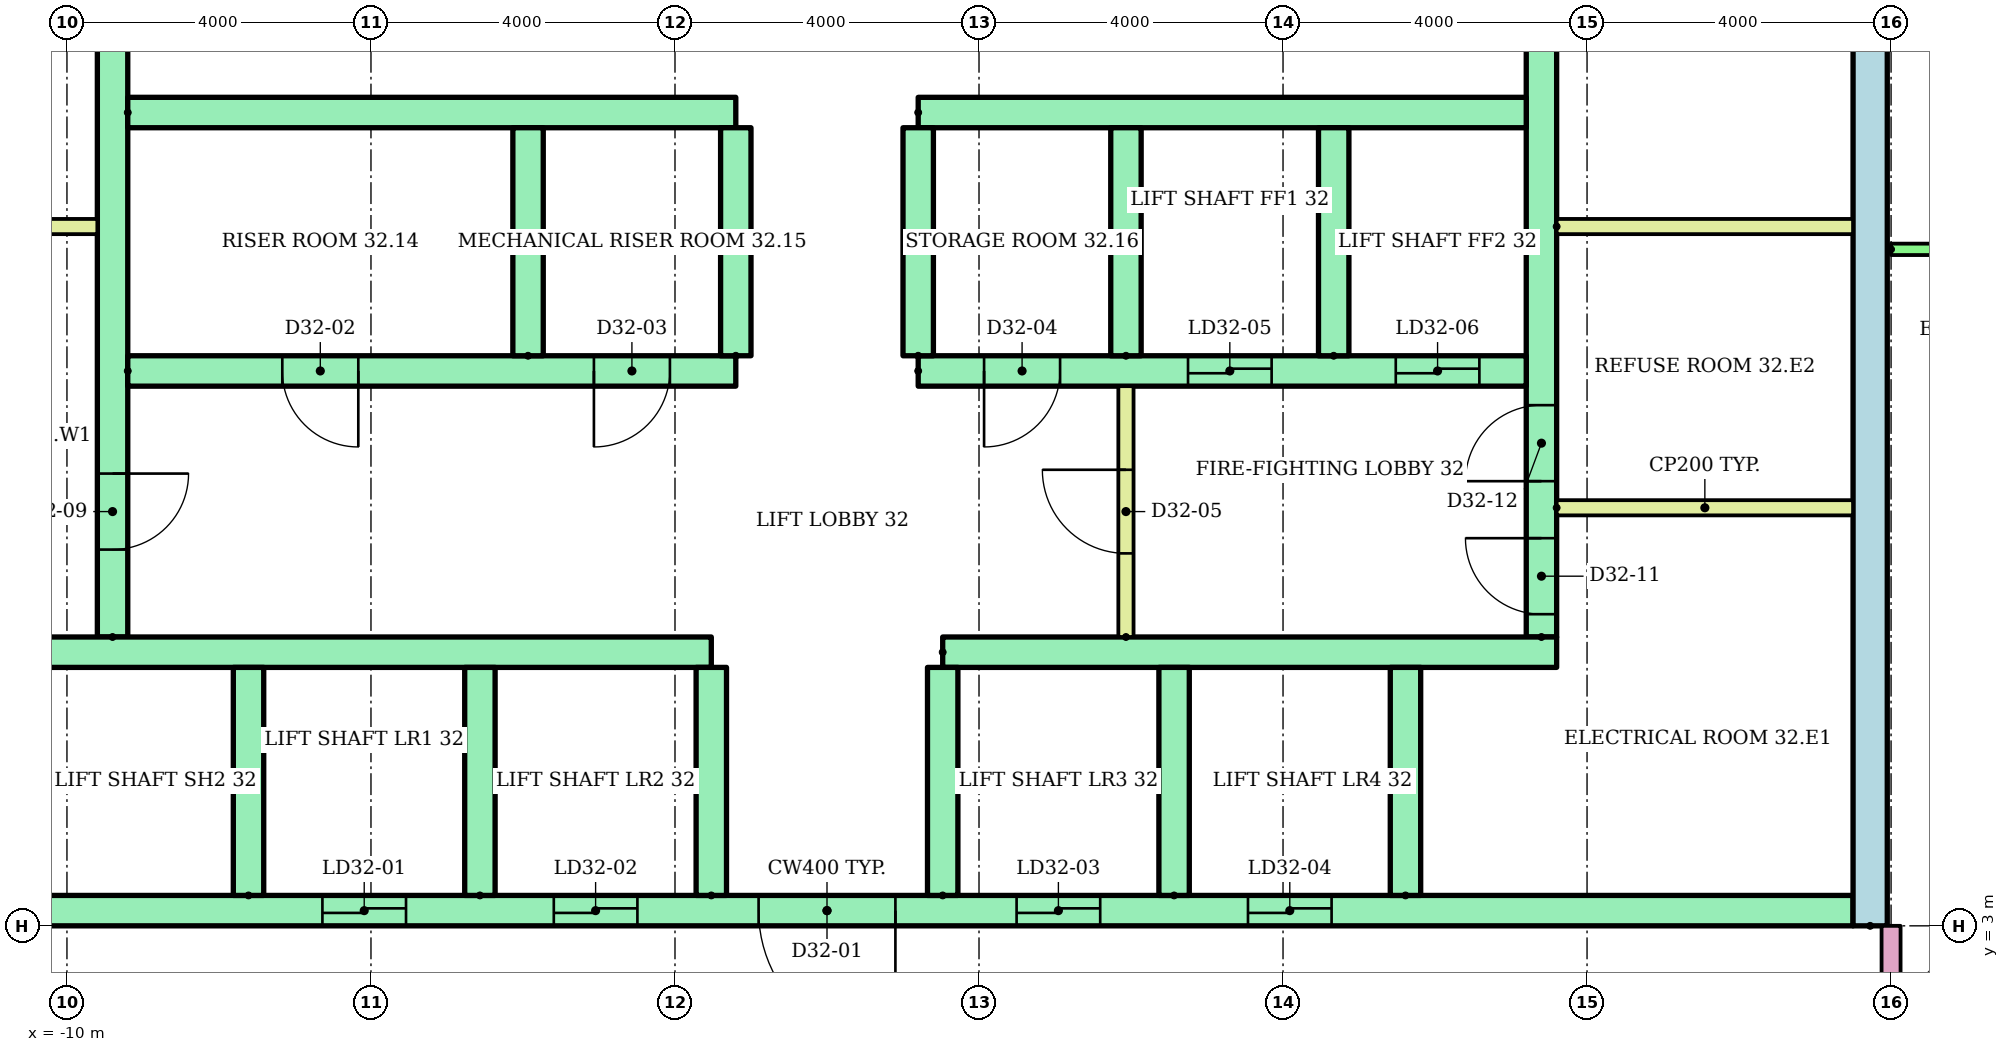
"""IFC4 building model, lengths in metres.
Left out: names, types, materials, properties, quantities, classifications, styles, units other than length and angle.
Written with IfcOpenShell. Run it as: python <this file> out.ifc"""

import sys

from ifc_helpers import new_model, si_unit, direction, frame, frame_2d, origin, place, context, subcontext, project, spatial, rectangle, extrude, element, fill, save


model = new_model("IFC4")
c1 = context("Model", 3, precision=1e-05, world=origin(), true_north=direction((0.0, 1.0)))
c2 = subcontext(c1, "Body", "Model", "MODEL_VIEW")
j1 = project(units=[si_unit("LENGTHUNIT", "METRE"), si_unit("PLANEANGLEUNIT", "RADIAN")], contexts=[c1])
p1 = place(None, origin())
s1 = spatial("IfcSite", under=j1, at=p1, CompositionType="ELEMENT")
p2 = place(p1, origin())
s2 = spatial("IfcBuilding", under=s1, at=p2, CompositionType="ELEMENT")
p3 = place(p2, frame((0.0, 0.0, 126.2)))
s3 = spatial("IfcBuildingStorey", under=s2, at=p3, CompositionType="ELEMENT", Elevation=126.2)
p4 = place(p3, frame((13.725, 3.0, 0.0), z_axis=(0.0, 0.0, 1.0), x_axis=(0.0, 1.0, 0.0)))
e1 = element("IfcWall", 1, at=p4, inside=s3, PredefinedType="SHEAR", context=c2, shape_type="SweptSolid", body=[
    extrude(rectangle(XDim=17.0, YDim=0.45, at=frame_2d((8.5, 0.0))), origin(), (0.0, 0.0, 1.0), 2.92),
])
p5 = place(p3, frame((-9.4, 6.8, 0.0), z_axis=(0.0, 0.0, 1.0), x_axis=(0.0, 1.0, 0.0)))
e2 = element("IfcWall", 2, at=p5, inside=s3, PredefinedType="SHEAR", context=c2, shape_type="SweptSolid", body=[
    extrude(rectangle(XDim=12.7, YDim=0.4, at=frame_2d((6.35, 0.0))), origin(), (0.0, 0.0, 1.0), 2.92),
])
p6 = place(p5, frame((1.15, 0.0, 0.0)))
e3 = element("IfcOpeningElement", 3, at=p6, cuts=e2, PredefinedType="OPENING", context=c2, shape_type="SweptSolid", body=[
    extrude(rectangle(XDim=1.0, YDim=2.1, at=frame_2d((0.5, 1.05))), frame((0.0, 0.21, 0.0), z_axis=(0.0, -1.0, 0.0), x_axis=(1.0, 0.0, 0.0)), (0.0, 0.0, 1.0), 0.42),
])
p7 = place(p5, frame((7.925, 0.0, 0.0)))
e4 = element("IfcOpeningElement", 4, at=p7, cuts=e2, PredefinedType="OPENING", context=c2, shape_type="SweptSolid", body=[
    extrude(rectangle(XDim=1.0, YDim=2.1, at=frame_2d((0.5, 1.05))), frame((0.0, 0.21, 0.0), z_axis=(0.0, -1.0, 0.0), x_axis=(1.0, 0.0, 0.0)), (0.0, 0.0, 1.0), 0.42),
])
p8 = place(p3, frame((9.4, 6.8, 0.0), z_axis=(0.0, 0.0, 1.0), x_axis=(0.0, 1.0, 0.0)))
e5 = element("IfcWall", 5, at=p8, inside=s3, PredefinedType="SHEAR", context=c2, shape_type="SweptSolid", body=[
    extrude(rectangle(XDim=12.7, YDim=0.4, at=frame_2d((6.35, 0.0))), origin(), (0.0, 0.0, 1.0), 2.92),
])
p9 = place(p8, frame((0.3, 0.0, 0.0)))
e6 = element("IfcOpeningElement", 6, at=p9, cuts=e5, PredefinedType="OPENING", context=c2, shape_type="SweptSolid", body=[
    extrude(rectangle(XDim=1.0, YDim=2.1, at=frame_2d((0.5, 1.05))), frame((0.0, 0.21, 0.0), z_axis=(0.0, -1.0, 0.0), x_axis=(1.0, 0.0, 0.0)), (0.0, 0.0, 1.0), 0.42),
])
p10 = place(p8, frame((2.05, 0.0, 0.0)))
e7 = element("IfcOpeningElement", 7, at=p10, cuts=e5, PredefinedType="OPENING", context=c2, shape_type="SweptSolid", body=[
    extrude(rectangle(XDim=1.0, YDim=2.1, at=frame_2d((0.5, 1.05))), frame((0.0, 0.21, 0.0), z_axis=(0.0, -1.0, 0.0), x_axis=(1.0, 0.0, 0.0)), (0.0, 0.0, 1.0), 0.42),
])
p11 = place(p8, frame((7.925, 0.0, 0.0)))
e8 = element("IfcOpeningElement", 8, at=p11, cuts=e5, PredefinedType="OPENING", context=c2, shape_type="SweptSolid", body=[
    extrude(rectangle(XDim=1.0, YDim=2.1, at=frame_2d((0.5, 1.05))), frame((0.0, 0.21, 0.0), z_axis=(0.0, -1.0, 0.0), x_axis=(1.0, 0.0, 0.0)), (0.0, 0.0, 1.0), 0.42),
])
p12 = place(p3, frame((-13.5, 3.2, 0.0)))
e9 = element("IfcWall", 9, at=p12, inside=s3, PredefinedType="SHEAR", context=c2, shape_type="SweptSolid", body=[
    extrude(rectangle(XDim=27.0, YDim=0.4, at=frame_2d((13.5, 0.0))), origin(), (0.0, 0.0, 1.0), 2.92),
])
p13 = place(p12, frame((6.861, 0.0, 0.0)))
e10 = element("IfcOpeningElement", 10, at=p13, cuts=e9, PredefinedType="OPENING", context=c2, shape_type="SweptSolid", body=[
    extrude(rectangle(XDim=1.1, YDim=2.1, at=frame_2d((0.55, 1.05))), frame((0.0, 0.21, 0.0), z_axis=(0.0, -1.0, 0.0), x_axis=(1.0, 0.0, 0.0)), (0.0, 0.0, 1.0), 0.42),
])
p14 = place(p12, frame((9.906, 0.0, 0.0)))
e11 = element("IfcOpeningElement", 11, at=p14, cuts=e9, PredefinedType="OPENING", context=c2, shape_type="SweptSolid", body=[
    extrude(rectangle(XDim=1.1, YDim=2.1, at=frame_2d((0.55, 1.05))), frame((0.0, 0.21, 0.0), z_axis=(0.0, -1.0, 0.0), x_axis=(1.0, 0.0, 0.0)), (0.0, 0.0, 1.0), 0.42),
])
p15 = place(p12, frame((15.994, 0.0, 0.0)))
e12 = element("IfcOpeningElement", 12, at=p15, cuts=e9, PredefinedType="OPENING", context=c2, shape_type="SweptSolid", body=[
    extrude(rectangle(XDim=1.1, YDim=2.1, at=frame_2d((0.55, 1.05))), frame((0.0, 0.21, 0.0), z_axis=(0.0, -1.0, 0.0), x_axis=(1.0, 0.0, 0.0)), (0.0, 0.0, 1.0), 0.42),
])
p16 = place(p12, frame((19.039, 0.0, 0.0)))
e13 = element("IfcOpeningElement", 13, at=p16, cuts=e9, PredefinedType="OPENING", context=c2, shape_type="SweptSolid", body=[
    extrude(rectangle(XDim=1.1, YDim=2.1, at=frame_2d((0.55, 1.05))), frame((0.0, 0.21, 0.0), z_axis=(0.0, -1.0, 0.0), x_axis=(1.0, 0.0, 0.0)), (0.0, 0.0, 1.0), 0.42),
])
p17 = place(p12, frame((12.6, 0.0, 0.0)))
e14 = element("IfcOpeningElement", 14, at=p17, cuts=e9, PredefinedType="OPENING", context=c2, shape_type="SweptSolid", body=[
    extrude(rectangle(XDim=1.8, YDim=2.1, at=frame_2d((0.9, 1.05))), frame((0.0, 0.21, 0.0), z_axis=(0.0, -1.0, 0.0), x_axis=(1.0, 0.0, 0.0)), (0.0, 0.0, 1.0), 0.42),
])
p18 = place(p3, frame((-13.5, 6.6, 0.0)))
e15 = element("IfcWall", 15, at=p18, inside=s3, PredefinedType="SHEAR", context=c2, shape_type="SweptSolid", body=[
    extrude(rectangle(XDim=11.978, YDim=0.4, at=frame_2d((5.989, 0.0))), origin(), (0.0, 0.0, 1.0), 2.92),
])
p19 = place(p3, frame((1.522, 6.6, 0.0)))
e16 = element("IfcWall", 16, at=p19, inside=s3, PredefinedType="SHEAR", context=c2, shape_type="SweptSolid", body=[
    extrude(rectangle(XDim=8.078, YDim=0.4, at=frame_2d((4.039, 0.0))), origin(), (0.0, 0.0, 1.0), 2.92),
])
for number, where, z_axis, x_axis in (
    (17, (-7.611, 3.4, 0.0), (0.0, 0.0, 1.0), (0.0, 1.0, 0.0)),
    (18, (-4.567, 3.4, 0.0), (0.0, 0.0, 1.0), (0.0, 1.0, 0.0)),
    (19, (-1.522, 3.4, 0.0), (0.0, 0.0, 1.0), (0.0, 1.0, 0.0)),
    (20, (1.522, 3.4, 0.0), (0.0, 0.0, 1.0), (0.0, 1.0, 0.0)),
    (21, (4.567, 3.4, 0.0), (0.0, 0.0, 1.0), (0.0, 1.0, 0.0)),
    (22, (7.611, 3.4, 0.0), (0.0, 0.0, 1.0), (0.0, 1.0, 0.0)),
):
    element("IfcWall", number, at=place(p3, frame(where, z_axis=z_axis, x_axis=x_axis)), inside=s3, PredefinedType="SHEAR", context=c2, shape_type="SweptSolid", body=[
        extrude(rectangle(XDim=3.0, YDim=0.4, at=frame_2d((1.5, 0.0))), origin(), (0.0, 0.0, 1.0), 2.92),
    ])
p20 = place(p3, frame((-9.2, 10.3, 0.0)))
e23 = element("IfcWall", 23, at=p20, inside=s3, PredefinedType="SHEAR", context=c2, shape_type="SweptSolid", body=[
    extrude(rectangle(XDim=8.0, YDim=0.4, at=frame_2d((4.0, 0.0))), origin(), (0.0, 0.0, 1.0), 2.92),
])
p21 = place(p20, frame((2.033, 0.0, 0.0)))
e24 = element("IfcOpeningElement", 24, at=p21, cuts=e23, PredefinedType="OPENING", context=c2, shape_type="SweptSolid", body=[
    extrude(rectangle(XDim=1.0, YDim=2.1, at=frame_2d((0.5, 1.05))), frame((0.0, 0.21, 0.0), z_axis=(0.0, -1.0, 0.0), x_axis=(1.0, 0.0, 0.0)), (0.0, 0.0, 1.0), 0.42),
])
p22 = place(p20, frame((6.133, 0.0, 0.0)))
e25 = element("IfcOpeningElement", 25, at=p22, cuts=e23, PredefinedType="OPENING", context=c2, shape_type="SweptSolid", body=[
    extrude(rectangle(XDim=1.0, YDim=2.1, at=frame_2d((0.5, 1.05))), frame((0.0, 0.21, 0.0), z_axis=(0.0, -1.0, 0.0), x_axis=(1.0, 0.0, 0.0)), (0.0, 0.0, 1.0), 0.42),
])
p23 = place(p3, frame((-9.2, 13.7, 0.0)))
e26 = element("IfcWall", 26, at=p23, inside=s3, PredefinedType="SHEAR", context=c2, shape_type="SweptSolid", body=[
    extrude(rectangle(XDim=8.0, YDim=0.4, at=frame_2d((4.0, 0.0))), origin(), (0.0, 0.0, 1.0), 2.92),
])
p24 = place(p3, frame((1.2, 10.3, 0.0)))
e27 = element("IfcWall", 27, at=p24, inside=s3, PredefinedType="SHEAR", context=c2, shape_type="SweptSolid", body=[
    extrude(rectangle(XDim=8.0, YDim=0.4, at=frame_2d((4.0, 0.0))), origin(), (0.0, 0.0, 1.0), 2.92),
])
p25 = place(p24, frame((3.55, 0.0, 0.0)))
e28 = element("IfcOpeningElement", 28, at=p25, cuts=e27, PredefinedType="OPENING", context=c2, shape_type="SweptSolid", body=[
    extrude(rectangle(XDim=1.1, YDim=2.1, at=frame_2d((0.55, 1.05))), frame((0.0, 0.21, 0.0), z_axis=(0.0, -1.0, 0.0), x_axis=(1.0, 0.0, 0.0)), (0.0, 0.0, 1.0), 0.42),
])
p26 = place(p24, frame((6.283, 0.0, 0.0)))
e29 = element("IfcOpeningElement", 29, at=p26, cuts=e27, PredefinedType="OPENING", context=c2, shape_type="SweptSolid", body=[
    extrude(rectangle(XDim=1.1, YDim=2.1, at=frame_2d((0.55, 1.05))), frame((0.0, 0.21, 0.0), z_axis=(0.0, -1.0, 0.0), x_axis=(1.0, 0.0, 0.0)), (0.0, 0.0, 1.0), 0.42),
])
p27 = place(p24, frame((0.867, 0.0, 0.0)))
e30 = element("IfcOpeningElement", 30, at=p27, cuts=e27, PredefinedType="OPENING", context=c2, shape_type="SweptSolid", body=[
    extrude(rectangle(XDim=1.0, YDim=2.1, at=frame_2d((0.5, 1.05))), frame((0.0, 0.21, 0.0), z_axis=(0.0, -1.0, 0.0), x_axis=(1.0, 0.0, 0.0)), (0.0, 0.0, 1.0), 0.42),
])
p28 = place(p3, frame((1.2, 13.7, 0.0)))
e31 = element("IfcWall", 31, at=p28, inside=s3, PredefinedType="SHEAR", context=c2, shape_type="SweptSolid", body=[
    extrude(rectangle(XDim=8.0, YDim=0.4, at=frame_2d((4.0, 0.0))), origin(), (0.0, 0.0, 1.0), 2.92),
])
for number, where, z_axis, x_axis in (
    (32, (-3.933, 10.5, 0.0), (0.0, 0.0, 1.0), (0.0, 1.0, 0.0)),
    (33, (-1.2, 10.5, 0.0), (0.0, 0.0, 1.0), (0.0, 1.0, 0.0)),
    (34, (1.2, 10.5, 0.0), (0.0, 0.0, 1.0), (0.0, 1.0, 0.0)),
    (35, (3.933, 10.5, 0.0), (0.0, 0.0, 1.0), (0.0, 1.0, 0.0)),
    (36, (6.667, 10.5, 0.0), (0.0, 0.0, 1.0), (0.0, 1.0, 0.0)),
):
    element("IfcWall", number, at=place(p3, frame(where, z_axis=z_axis, x_axis=x_axis)), inside=s3, PredefinedType="SHEAR", context=c2, shape_type="SweptSolid", body=[
        extrude(rectangle(XDim=3.0, YDim=0.4, at=frame_2d((1.5, 0.0))), origin(), (0.0, 0.0, 1.0), 2.92),
    ])
p29 = place(p3, frame((3.933, 6.8, 0.0), z_axis=(0.0, 0.0, 1.0), x_axis=(0.0, 1.0, 0.0)))
e37 = element("IfcWall", 37, at=p29, inside=s3, PredefinedType="PARTITIONING", context=c2, shape_type="SweptSolid", body=[
    extrude(rectangle(XDim=3.3, YDim=0.2, at=frame_2d((1.65, 0.0))), origin(), (0.0, 0.0, 1.0), 2.92),
])
p30 = place(p29, frame((1.1, 0.0, 0.0)))
e38 = element("IfcOpeningElement", 38, at=p30, cuts=e37, PredefinedType="OPENING", context=c2, shape_type="SweptSolid", body=[
    extrude(rectangle(XDim=1.1, YDim=2.1, at=frame_2d((0.55, 1.05))), frame((0.0, 0.11, 0.0), z_axis=(0.0, -1.0, 0.0), x_axis=(1.0, 0.0, 0.0)), (0.0, 0.0, 1.0), 0.22),
])
for number, where in (
    (39, (-13.5, 12.2, 0.0)),
    (40, (9.6, 8.5, 0.0)),
    (41, (9.6, 12.2, 0.0)),
):
    element("IfcWall", number, at=place(p3, frame(where)), inside=s3, PredefinedType="PARTITIONING", context=c2, shape_type="SweptSolid", body=[
        extrude(rectangle(XDim=3.9, YDim=0.2, at=frame_2d((1.95, 0.0))), origin(), (0.0, 0.0, 1.0), 2.92),
    ])
p31 = place(p3, frame((14.0, 11.9, 0.0)))
e42 = element("IfcWall", 42, at=p31, inside=s3, PredefinedType="PARTITIONING", context=c2, shape_type="SweptSolid", body=[
    extrude(rectangle(XDim=18.72, YDim=0.15, at=frame_2d((9.36, 0.0))), origin(), (0.0, 0.0, 1.0), 2.4),
])
p32 = place(p31, frame((1.5, 0.0, 0.0)))
e43 = element("IfcOpeningElement", 43, at=p32, cuts=e42, PredefinedType="OPENING", context=c2, shape_type="SweptSolid", body=[
    extrude(rectangle(XDim=1.0, YDim=2.1, at=frame_2d((0.5, 1.05))), frame((0.0, 0.085, 0.0), z_axis=(0.0, -1.0, 0.0), x_axis=(1.0, 0.0, 0.0)), (0.0, 0.0, 1.0), 0.17),
])
p33 = place(p31, frame((7.55, 0.0, 0.0)))
e44 = element("IfcOpeningElement", 44, at=p33, cuts=e42, PredefinedType="OPENING", context=c2, shape_type="SweptSolid", body=[
    extrude(rectangle(XDim=0.9, YDim=2.1, at=frame_2d((0.45, 1.05))), frame((0.0, 0.085, 0.0), z_axis=(0.0, -1.0, 0.0), x_axis=(1.0, 0.0, 0.0)), (0.0, 0.0, 1.0), 0.17),
])
p34 = place(p31, frame((14.8, 0.0, 0.0)))
e45 = element("IfcOpeningElement", 45, at=p34, cuts=e42, PredefinedType="OPENING", context=c2, shape_type="SweptSolid", body=[
    extrude(rectangle(XDim=0.9, YDim=2.1, at=frame_2d((0.45, 1.05))), frame((0.0, 0.085, 0.0), z_axis=(0.0, -1.0, 0.0), x_axis=(1.0, 0.0, 0.0)), (0.0, 0.0, 1.0), 0.17),
])
p35 = place(p3, frame((14.0, 1.4, 0.0), z_axis=(0.0, 0.0, 1.0), x_axis=(0.0, 1.0, 0.0)))
e46 = element("IfcWall", 46, at=p35, inside=s3, PredefinedType="PARTITIONING", context=c2, shape_type="SweptSolid", body=[
    extrude(rectangle(XDim=1.6, YDim=0.25, at=frame_2d((0.8, 0.0))), origin(), (0.0, 0.0, 1.0), 2.4),
])
p36 = place(p13, origin())
e47 = element("IfcDoor", 47, at=p36, inside=s3, OperationType="SLIDING_TO_LEFT", PredefinedType="DOOR", context=c2, shape_type="SweptSolid", body=[
    extrude(rectangle(XDim=1.1, YDim=2.1, at=frame_2d((0.55, 1.05))), frame((0.0, 0.025, 0.0), z_axis=(0.0, -1.0, 0.0), x_axis=(1.0, 0.0, 0.0)), (0.0, 0.0, 1.0), 0.05),
])
fill(e10, e47)
p37 = place(p14, origin())
e48 = element("IfcDoor", 48, at=p37, inside=s3, OperationType="SLIDING_TO_LEFT", PredefinedType="DOOR", context=c2, shape_type="SweptSolid", body=[
    extrude(rectangle(XDim=1.1, YDim=2.1, at=frame_2d((0.55, 1.05))), frame((0.0, 0.025, 0.0), z_axis=(0.0, -1.0, 0.0), x_axis=(1.0, 0.0, 0.0)), (0.0, 0.0, 1.0), 0.05),
])
fill(e11, e48)
p38 = place(p15, origin())
e49 = element("IfcDoor", 49, at=p38, inside=s3, OperationType="SLIDING_TO_LEFT", PredefinedType="DOOR", context=c2, shape_type="SweptSolid", body=[
    extrude(rectangle(XDim=1.1, YDim=2.1, at=frame_2d((0.55, 1.05))), frame((0.0, 0.025, 0.0), z_axis=(0.0, -1.0, 0.0), x_axis=(1.0, 0.0, 0.0)), (0.0, 0.0, 1.0), 0.05),
])
fill(e12, e49)
p39 = place(p16, origin())
e50 = element("IfcDoor", 50, at=p39, inside=s3, OperationType="SLIDING_TO_LEFT", PredefinedType="DOOR", context=c2, shape_type="SweptSolid", body=[
    extrude(rectangle(XDim=1.1, YDim=2.1, at=frame_2d((0.55, 1.05))), frame((0.0, 0.025, 0.0), z_axis=(0.0, -1.0, 0.0), x_axis=(1.0, 0.0, 0.0)), (0.0, 0.0, 1.0), 0.05),
])
fill(e13, e50)
p40 = place(p17, frame((1.8, 0.0, 0.0), z_axis=(0.0, 0.0, 1.0), x_axis=(-1.0, 0.0, 0.0)))
e51 = element("IfcDoor", 51, at=p40, inside=s3, OperationType="DOUBLE_DOOR_SINGLE_SWING", PredefinedType="DOOR", context=c2, shape_type="SweptSolid", body=[
    extrude(rectangle(XDim=1.8, YDim=2.1, at=frame_2d((0.9, 1.05))), frame((0.0, 0.025, 0.0), z_axis=(0.0, -1.0, 0.0), x_axis=(1.0, 0.0, 0.0)), (0.0, 0.0, 1.0), 0.05),
])
fill(e14, e51)
p41 = place(p25, origin())
e52 = element("IfcDoor", 52, at=p41, inside=s3, OperationType="SLIDING_TO_LEFT", PredefinedType="DOOR", context=c2, shape_type="SweptSolid", body=[
    extrude(rectangle(XDim=1.1, YDim=2.1, at=frame_2d((0.55, 1.05))), frame((0.0, 0.025, 0.0), z_axis=(0.0, -1.0, 0.0), x_axis=(1.0, 0.0, 0.0)), (0.0, 0.0, 1.0), 0.05),
])
fill(e28, e52)
p42 = place(p26, origin())
e53 = element("IfcDoor", 53, at=p42, inside=s3, OperationType="SLIDING_TO_LEFT", PredefinedType="DOOR", context=c2, shape_type="SweptSolid", body=[
    extrude(rectangle(XDim=1.1, YDim=2.1, at=frame_2d((0.55, 1.05))), frame((0.0, 0.025, 0.0), z_axis=(0.0, -1.0, 0.0), x_axis=(1.0, 0.0, 0.0)), (0.0, 0.0, 1.0), 0.05),
])
fill(e29, e53)
p43 = place(p21, frame((1.0, 0.0, 0.0), z_axis=(0.0, 0.0, 1.0), x_axis=(-1.0, 0.0, 0.0)))
e54 = element("IfcDoor", 54, at=p43, inside=s3, OperationType="SINGLE_SWING_RIGHT", PredefinedType="DOOR", context=c2, shape_type="SweptSolid", body=[
    extrude(rectangle(XDim=1.0, YDim=2.1, at=frame_2d((0.5, 1.05))), frame((0.0, 0.025, 0.0), z_axis=(0.0, -1.0, 0.0), x_axis=(1.0, 0.0, 0.0)), (0.0, 0.0, 1.0), 0.05),
])
fill(e24, e54)
p44 = place(p22, frame((1.0, 0.0, 0.0), z_axis=(0.0, 0.0, 1.0), x_axis=(-1.0, 0.0, 0.0)))
e55 = element("IfcDoor", 55, at=p44, inside=s3, OperationType="SINGLE_SWING_LEFT", PredefinedType="DOOR", context=c2, shape_type="SweptSolid", body=[
    extrude(rectangle(XDim=1.0, YDim=2.1, at=frame_2d((0.5, 1.05))), frame((0.0, 0.025, 0.0), z_axis=(0.0, -1.0, 0.0), x_axis=(1.0, 0.0, 0.0)), (0.0, 0.0, 1.0), 0.05),
])
fill(e25, e55)
p45 = place(p27, frame((1.0, 0.0, 0.0), z_axis=(0.0, 0.0, 1.0), x_axis=(-1.0, 0.0, 0.0)))
e56 = element("IfcDoor", 56, at=p45, inside=s3, OperationType="SINGLE_SWING_LEFT", PredefinedType="DOOR", context=c2, shape_type="SweptSolid", body=[
    extrude(rectangle(XDim=1.0, YDim=2.1, at=frame_2d((0.5, 1.05))), frame((0.0, 0.025, 0.0), z_axis=(0.0, -1.0, 0.0), x_axis=(1.0, 0.0, 0.0)), (0.0, 0.0, 1.0), 0.05),
])
fill(e30, e56)
p46 = place(p30, origin())
e57 = element("IfcDoor", 57, at=p46, inside=s3, OperationType="SINGLE_SWING_RIGHT", PredefinedType="DOOR", context=c2, shape_type="SweptSolid", body=[
    extrude(rectangle(XDim=1.1, YDim=2.1, at=frame_2d((0.55, 1.05))), frame((0.0, 0.025, 0.0), z_axis=(0.0, -1.0, 0.0), x_axis=(1.0, 0.0, 0.0)), (0.0, 0.0, 1.0), 0.05),
])
fill(e38, e57)
p47 = place(p6, frame((1.0, 0.0, 0.0), z_axis=(0.0, 0.0, 1.0), x_axis=(-1.0, 0.0, 0.0)))
e58 = element("IfcDoor", 58, at=p47, inside=s3, OperationType="SINGLE_SWING_RIGHT", PredefinedType="DOOR", context=c2, shape_type="SweptSolid", body=[
    extrude(rectangle(XDim=1.0, YDim=2.1, at=frame_2d((0.5, 1.05))), frame((0.0, 0.025, 0.0), z_axis=(0.0, -1.0, 0.0), x_axis=(1.0, 0.0, 0.0)), (0.0, 0.0, 1.0), 0.05),
])
fill(e3, e58)
p48 = place(p9, origin())
e59 = element("IfcDoor", 59, at=p48, inside=s3, OperationType="SINGLE_SWING_RIGHT", PredefinedType="DOOR", context=c2, shape_type="SweptSolid", body=[
    extrude(rectangle(XDim=1.0, YDim=2.1, at=frame_2d((0.5, 1.05))), frame((0.0, 0.025, 0.0), z_axis=(0.0, -1.0, 0.0), x_axis=(1.0, 0.0, 0.0)), (0.0, 0.0, 1.0), 0.05),
])
fill(e6, e59)
p49 = place(p10, origin())
e60 = element("IfcDoor", 60, at=p49, inside=s3, OperationType="SINGLE_SWING_LEFT", PredefinedType="DOOR", context=c2, shape_type="SweptSolid", body=[
    extrude(rectangle(XDim=1.0, YDim=2.1, at=frame_2d((0.5, 1.05))), frame((0.0, 0.025, 0.0), z_axis=(0.0, -1.0, 0.0), x_axis=(1.0, 0.0, 0.0)), (0.0, 0.0, 1.0), 0.05),
])
fill(e7, e60)
save(model, sys.argv[1])
